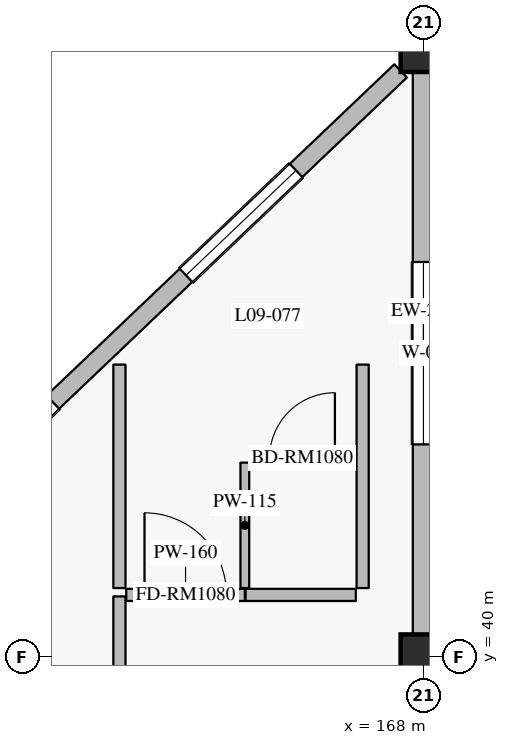
"""IFC4 building model, lengths in metres.
Left out: names, types, materials, properties, quantities, classifications, styles, units other than length and angle.
Written with IfcOpenShell. Run it as: python <this file> out.ifc"""

import sys

from ifc_helpers import new_model, si_unit, direction, frame, frame_2d, origin, origin_2d, place, context, subcontext, project, spatial, rectangle, extrude, element, fill, save


model = new_model("IFC4")
c1 = context("Model", 3, precision=1e-05, world=origin(), true_north=direction((0.0, 1.0)))
c2 = subcontext(c1, "Body", "Model", "MODEL_VIEW")
j1 = project(units=[si_unit("LENGTHUNIT", "METRE"), si_unit("PLANEANGLEUNIT", "RADIAN")], contexts=[c1])
p1 = place(None, origin())
s1 = spatial("IfcSite", under=j1, at=p1, CompositionType="ELEMENT")
p2 = place(p1, origin())
s2 = spatial("IfcBuilding", under=s1, at=p2, CompositionType="ELEMENT")
p3 = place(p2, frame((0.0, 0.0, 39.6)))
s3 = spatial("IfcBuildingStorey", under=s2, at=p3, CompositionType="ELEMENT", Elevation=39.6)
for number, where, z_axis, x_axis in (
    (1, (168.0, 48.0, 0.0), (0.0, 0.0, 1.0), (1.0, 0.0, 0.0)),
    (2, (168.0, 40.0, 0.0), (0.0, 0.0, 1.0), (1.0, 0.0, 0.0)),
):
    element("IfcColumn", number, at=place(p3, frame(where, z_axis=z_axis, x_axis=x_axis)), inside=s3, PredefinedType="COLUMN", context=c2, shape_type="SweptSolid", body=[
        extrude(rectangle(XDim=0.6, YDim=0.6, at=origin_2d()), origin(), (0.0, 0.0, 1.0), 3.6),
    ])
p4 = place(p3, frame((159.9, 40.286, 0.0), z_axis=(0.0, 0.0, 1.0), x_axis=(0.724156257633, 0.689635928973, 0.0)))
e3 = element("IfcWall", 3, at=p4, inside=s3, PredefinedType="SOLIDWALL", context=c2, shape_type="SweptSolid", body=[
    extrude(rectangle(XDim=10.771, YDim=0.24, at=frame_2d((5.386, 0.0))), origin(), (0.0, 0.0, 1.0), 2.94),
])
p5 = place(p4, frame((2.452, 0.0, 0.8)))
e4 = element("IfcOpeningElement", 4, at=p5, cuts=e3, PredefinedType="OPENING", context=c2, shape_type="SweptSolid", body=[
    extrude(rectangle(XDim=2.0, YDim=1.75, at=frame_2d((1.0, 0.875))), frame((0.0, 0.13, 0.0), z_axis=(0.0, -1.0, 0.0), x_axis=(1.0, 0.0, 0.0)), (0.0, 0.0, 1.0), 0.26),
])
p6 = place(p4, frame((6.871, 0.0, 0.8)))
e5 = element("IfcOpeningElement", 5, at=p6, cuts=e3, PredefinedType="OPENING", context=c2, shape_type="SweptSolid", body=[
    extrude(rectangle(XDim=2.0, YDim=1.75, at=frame_2d((1.0, 0.875))), frame((0.0, 0.13, 0.0), z_axis=(0.0, -1.0, 0.0), x_axis=(1.0, 0.0, 0.0)), (0.0, 0.0, 1.0), 0.26),
])
p7 = place(p3, frame((168.0, 47.7, 0.0), z_axis=(0.0, 0.0, 1.0), x_axis=(0.0, -1.0, 0.0)))
e6 = element("IfcWall", 6, at=p7, inside=s3, PredefinedType="SOLIDWALL", context=c2, shape_type="SweptSolid", body=[
    extrude(rectangle(XDim=7.4, YDim=0.28, at=frame_2d((3.7, 0.0))), origin(), (0.0, 0.0, 1.0), 2.7),
])
p8 = place(p7, frame((2.5, 0.0, 0.5)))
e7 = element("IfcOpeningElement", 7, at=p8, cuts=e6, PredefinedType="OPENING", context=c2, shape_type="SweptSolid", body=[
    extrude(rectangle(XDim=2.4, YDim=1.65, at=frame_2d((1.2, 0.825))), frame((0.0, 0.15, 0.0), z_axis=(0.0, -1.0, 0.0), x_axis=(1.0, 0.0, 0.0)), (0.0, 0.0, 1.0), 0.3),
])
p9 = place(p3, frame((164.0, 32.26, 0.0), z_axis=(0.0, 0.0, 1.0), x_axis=(0.0, 1.0, 0.0)))
e8 = element("IfcWall", 8, at=p9, inside=s3, PredefinedType="PARTITIONING", context=c2, shape_type="SweptSolid", body=[
    extrude(rectangle(XDim=8.54, YDim=0.16, at=frame_2d((4.27, 0.0))), origin(), (0.0, 0.0, 1.0), 3.335),
])
p10 = place(p3, frame((164.09, 40.82, 0.0), z_axis=(0.0, 0.0, 1.0), x_axis=(1.0, 0.0, 0.0)))
e9 = element("IfcWall", 9, at=p10, inside=s3, PredefinedType="PARTITIONING", context=c2, shape_type="SweptSolid", body=[
    extrude(rectangle(XDim=1.56, YDim=0.16, at=frame_2d((0.78, 0.0))), origin(), (0.0, 0.0, 1.0), 3.335),
])
p11 = place(p10, frame((0.24, 0.0, 0.0)))
e10 = element("IfcOpeningElement", 10, at=p11, cuts=e9, PredefinedType="OPENING", context=c2, shape_type="SweptSolid", body=[
    extrude(rectangle(XDim=1.08, YDim=2.3, at=frame_2d((0.54, 1.15))), frame((0.0, 0.09, 0.0), z_axis=(0.0, -1.0, 0.0), x_axis=(1.0, 0.0, 0.0)), (0.0, 0.0, 1.0), 0.18),
])
p12 = place(p3, frame((165.66, 40.82, 0.0), z_axis=(0.0, 0.0, 1.0), x_axis=(1.0, 0.0, 0.0)))
e11 = element("IfcWall", 11, at=p12, inside=s3, PredefinedType="PARTITIONING", context=c2, shape_type="SweptSolid", body=[
    extrude(rectangle(XDim=1.45, YDim=0.16, at=frame_2d((0.725, 0.0))), origin(), (0.0, 0.0, 1.0), 3.335),
])
p13 = place(p3, frame((165.65, 40.91, 0.0), z_axis=(0.0, 0.0, 1.0), x_axis=(0.0, 1.0, 0.0)))
e12 = element("IfcWall", 12, at=p13, inside=s3, PredefinedType="PARTITIONING", context=c2, shape_type="SweptSolid", body=[
    extrude(rectangle(XDim=1.65, YDim=0.115, at=frame_2d((0.825, 0.0))), origin(), (0.0, 0.0, 1.0), 3.335),
])
p14 = place(p3, frame((165.71, 42.62, 0.0), z_axis=(0.0, 0.0, 1.0), x_axis=(1.0, 0.0, 0.0)))
e13 = element("IfcWall", 13, at=p14, inside=s3, PredefinedType="PARTITIONING", context=c2, shape_type="SweptSolid", body=[
    extrude(rectangle(XDim=1.39, YDim=0.115, at=frame_2d((0.695, 0.0))), origin(), (0.0, 0.0, 1.0), 3.335),
])
p15 = place(p14, frame((0.265, 0.0, 0.0)))
e14 = element("IfcOpeningElement", 14, at=p15, cuts=e13, PredefinedType="OPENING", context=c2, shape_type="SweptSolid", body=[
    extrude(rectangle(XDim=0.86, YDim=2.12, at=frame_2d((0.43, 1.06))), frame((0.0, 0.067, 0.0), z_axis=(0.0, -1.0, 0.0), x_axis=(1.0, 0.0, 0.0)), (0.0, 0.0, 1.0), 0.135),
])
for number, where, z_axis, x_axis in (
    (15, (164.0, 40.91, 0.0), (0.0, 0.0, 1.0), (0.0, 1.0, 0.0)),
    (16, (167.2, 40.91, 0.0), (0.0, 0.0, 1.0), (0.0, 1.0, 0.0)),
):
    element("IfcWall", number, at=place(p3, frame(where, z_axis=z_axis, x_axis=x_axis)), inside=s3, PredefinedType="PARTITIONING", context=c2, shape_type="SweptSolid", body=[
        extrude(rectangle(XDim=2.94, YDim=0.16, at=frame_2d((1.47, 0.0))), origin(), (0.0, 0.0, 1.0), 3.335),
    ])
p16 = place(p5, origin())
e17 = element("IfcWindow", 17, at=p16, inside=s3, PartitioningType="DOUBLE_PANEL_VERTICAL", PredefinedType="WINDOW", context=c2, shape_type="SweptSolid", body=[
    extrude(rectangle(XDim=2.0, YDim=1.75, at=frame_2d((1.0, 0.875))), frame((0.0, 0.03, 0.0), z_axis=(0.0, -1.0, 0.0), x_axis=(1.0, 0.0, 0.0)), (0.0, 0.0, 1.0), 0.06),
])
fill(e4, e17)
p17 = place(p6, origin())
e18 = element("IfcWindow", 18, at=p17, inside=s3, PartitioningType="DOUBLE_PANEL_VERTICAL", PredefinedType="WINDOW", context=c2, shape_type="SweptSolid", body=[
    extrude(rectangle(XDim=2.0, YDim=1.75, at=frame_2d((1.0, 0.875))), frame((0.0, 0.03, 0.0), z_axis=(0.0, -1.0, 0.0), x_axis=(1.0, 0.0, 0.0)), (0.0, 0.0, 1.0), 0.06),
])
fill(e5, e18)
p18 = place(p8, origin())
e19 = element("IfcWindow", 19, at=p18, inside=s3, PartitioningType="DOUBLE_PANEL_VERTICAL", PredefinedType="WINDOW", context=c2, shape_type="SweptSolid", body=[
    extrude(rectangle(XDim=2.4, YDim=1.65, at=frame_2d((1.2, 0.825))), frame((0.0, 0.03, 0.0), z_axis=(0.0, -1.0, 0.0), x_axis=(1.0, 0.0, 0.0)), (0.0, 0.0, 1.0), 0.06),
])
fill(e7, e19)
p19 = place(p11, origin())
e20 = element("IfcDoor", 20, at=p19, inside=s3, OperationType="SINGLE_SWING_LEFT", PredefinedType="DOOR", context=c2, shape_type="SweptSolid", body=[
    extrude(rectangle(XDim=1.08, YDim=2.3, at=frame_2d((0.54, 1.15))), frame((0.0, 0.025, 0.0), z_axis=(0.0, -1.0, 0.0), x_axis=(1.0, 0.0, 0.0)), (0.0, 0.0, 1.0), 0.05),
])
fill(e10, e20)
p20 = place(p15, origin())
e21 = element("IfcDoor", 21, at=p20, inside=s3, OperationType="SINGLE_SWING_RIGHT", PredefinedType="DOOR", context=c2, shape_type="SweptSolid", body=[
    extrude(rectangle(XDim=0.86, YDim=2.12, at=frame_2d((0.43, 1.06))), frame((0.0, 0.025, 0.0), z_axis=(0.0, -1.0, 0.0), x_axis=(1.0, 0.0, 0.0)), (0.0, 0.0, 1.0), 0.05),
])
fill(e14, e21)
save(model, sys.argv[1])
